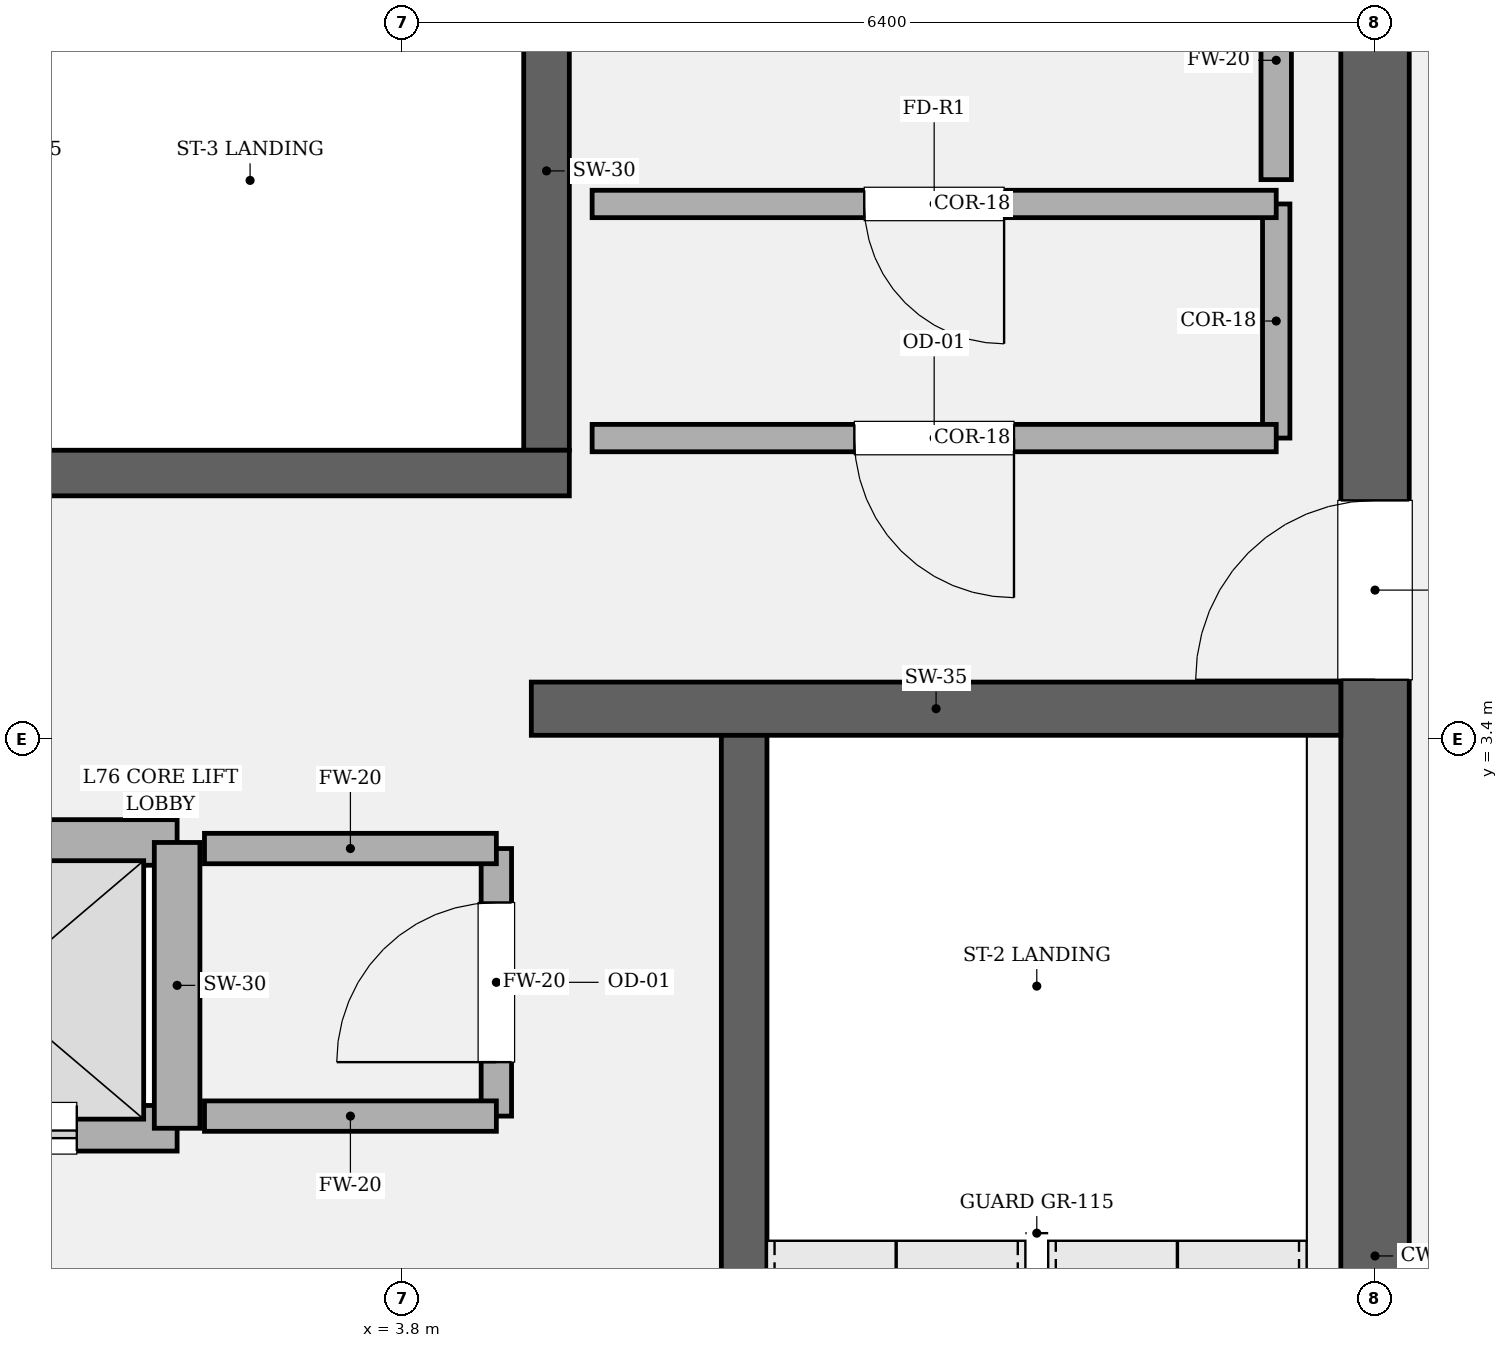
"""IFC4 building model, lengths in metres.
Left out: names, types, materials, properties, quantities, classifications, styles, units other than length and angle.
Written with IfcOpenShell. Run it as: python <this file> out.ifc"""

import sys

from ifc_helpers import new_model, si_unit, direction, frame, frame_2d, origin, place, context, subcontext, project, spatial, rectangle, extrude, element, fill, save


model = new_model("IFC4")
c1 = context("Model", 3, precision=1e-05, world=origin(), true_north=direction((0.0, 1.0)))
c2 = subcontext(c1, "Body", "Model", "MODEL_VIEW")
j1 = project(units=[si_unit("LENGTHUNIT", "METRE"), si_unit("PLANEANGLEUNIT", "RADIAN")], contexts=[c1])
p1 = place(None, origin())
s1 = spatial("IfcSite", under=j1, at=p1, CompositionType="ELEMENT")
p2 = place(p1, origin())
s2 = spatial("IfcBuilding", under=s1, at=p2, CompositionType="ELEMENT")
p3 = place(p2, frame((0.0, 0.0, 321.6)))
s3 = spatial("IfcBuildingStorey", under=s2, at=p3, CompositionType="ELEMENT", Elevation=321.6)
p4 = place(p3, frame((10.2, 8.975, 0.0), z_axis=(0.0, 0.0, 1.0), x_axis=(0.0, -1.0, 0.0)))
e1 = element("IfcWall", 1, at=p4, inside=s3, PredefinedType="SHEAR", context=c2, shape_type="SweptSolid", body=[
    extrude(rectangle(XDim=17.95, YDim=0.45, at=frame_2d((8.975, 0.0))), origin(), (0.0, 0.0, 1.0), 4.2),
])
p5 = place(p4, frame((4.005, 0.0, 0.0)))
e2 = element("IfcOpeningElement", 2, at=p5, cuts=e1, PredefinedType="OPENING", context=c2, shape_type="SweptSolid", body=[
    extrude(rectangle(XDim=1.18, YDim=2.2, at=frame_2d((0.59, 1.1))), frame((0.0, 0.235, 0.0), z_axis=(0.0, -1.0, 0.0), x_axis=(1.0, 0.0, 0.0)), (0.0, 0.0, 1.0), 0.47),
])
p6 = place(p3, frame((6.05, 3.45, 0.0), z_axis=(0.0, 0.0, 1.0), x_axis=(0.0, -1.0, 0.0)))
e3 = element("IfcWall", 3, at=p6, inside=s3, PredefinedType="SOLIDWALL", context=c2, shape_type="SweptSolid", body=[
    extrude(rectangle(XDim=8.95, YDim=0.3, at=frame_2d((4.475, 0.0))), origin(), (0.0, 0.0, 1.0), 4.2),
])
p7 = place(p3, frame((4.75, 8.975, 0.0), z_axis=(0.0, 0.0, 1.0), x_axis=(0.0, -1.0, 0.0)))
e4 = element("IfcWall", 4, at=p7, inside=s3, PredefinedType="SOLIDWALL", context=c2, shape_type="SweptSolid", body=[
    extrude(rectangle(XDim=3.675, YDim=0.3, at=frame_2d((1.837, 0.0))), origin(), (0.0, 0.0, 1.0), 4.2),
])
p8 = place(p3, frame((-4.9, 5.15, 0.0), z_axis=(0.0, 0.0, 1.0), x_axis=(1.0, 0.0, 0.0)))
e5 = element("IfcWall", 5, at=p8, inside=s3, PredefinedType="SOLIDWALL", context=c2, shape_type="SweptSolid", body=[
    extrude(rectangle(XDim=9.8, YDim=0.3, at=frame_2d((4.9, 0.0))), origin(), (0.0, 0.0, 1.0), 4.2),
])
p9 = place(p8, frame((0.56, 0.0, 0.0)))
e6 = element("IfcOpeningElement", 6, at=p9, cuts=e5, PredefinedType="OPENING", context=c2, shape_type="SweptSolid", body=[
    extrude(rectangle(XDim=1.18, YDim=2.2, at=frame_2d((0.59, 1.1))), frame((0.0, 0.16, 0.0), z_axis=(0.0, -1.0, 0.0), x_axis=(1.0, 0.0, 0.0)), (0.0, 0.0, 1.0), 0.32),
])
p10 = place(p3, frame((4.65, 3.6, 0.0), z_axis=(0.0, 0.0, 1.0), x_axis=(1.0, 0.0, 0.0)))
e7 = element("IfcWall", 7, at=p10, inside=s3, PredefinedType="SOLIDWALL", context=c2, shape_type="SweptSolid", body=[
    extrude(rectangle(XDim=5.325, YDim=0.35, at=frame_2d((2.663, 0.0))), origin(), (0.0, 0.0, 1.0), 4.2),
])
p11 = place(p3, frame((-2.32, 0.84, 0.0), z_axis=(0.0, 0.0, 1.0), x_axis=(1.0, 0.0, 0.0)))
e8 = element("IfcWall", 8, at=p11, inside=s3, PredefinedType="SOLIDWALL", context=c2, shape_type="SweptSolid", body=[
    extrude(rectangle(XDim=4.64, YDim=0.3, at=frame_2d((2.32, 0.0))), origin(), (0.0, 0.0, 1.0), 4.0),
])
p12 = place(p11, frame((0.66, 0.0, 0.0)))
e9 = element("IfcOpeningElement", 9, at=p12, cuts=e8, PredefinedType="OPENING", context=c2, shape_type="SweptSolid", body=[
    extrude(rectangle(XDim=1.12, YDim=2.25, at=frame_2d((0.56, 1.125))), frame((0.0, 0.16, 0.0), z_axis=(0.0, -1.0, 0.0), x_axis=(1.0, 0.0, 0.0)), (0.0, 0.0, 1.0), 0.32),
])
p13 = place(p11, frame((2.86, 0.0, 0.0)))
e10 = element("IfcOpeningElement", 10, at=p13, cuts=e8, PredefinedType="OPENING", context=c2, shape_type="SweptSolid", body=[
    extrude(rectangle(XDim=1.12, YDim=2.25, at=frame_2d((0.56, 1.125))), frame((0.0, 0.16, 0.0), z_axis=(0.0, -1.0, 0.0), x_axis=(1.0, 0.0, 0.0)), (0.0, 0.0, 1.0), 0.32),
])
p14 = place(p3, frame((-2.32, 2.72, 0.0), z_axis=(0.0, 0.0, 1.0), x_axis=(1.0, 0.0, 0.0)))
e11 = element("IfcWall", 11, at=p14, inside=s3, PredefinedType="SOLIDWALL", context=c2, shape_type="SweptSolid", body=[
    extrude(rectangle(XDim=4.64, YDim=0.3, at=frame_2d((2.32, 0.0))), origin(), (0.0, 0.0, 1.0), 4.0),
])
p15 = place(p3, frame((2.32, 0.84, 0.0), z_axis=(0.0, 0.0, 1.0), x_axis=(0.0, 1.0, 0.0)))
e12 = element("IfcWall", 12, at=p15, inside=s3, PredefinedType="SOLIDWALL", context=c2, shape_type="SweptSolid", body=[
    extrude(rectangle(XDim=1.88, YDim=0.3, at=frame_2d((0.94, 0.0))), origin(), (0.0, 0.0, 1.0), 4.0),
])
p16 = place(p3, frame((4.42, 0.92, 0.0), z_axis=(0.0, 0.0, 1.0), x_axis=(0.0, 1.0, 0.0)))
e13 = element("IfcWall", 13, at=p16, inside=s3, PredefinedType="SOLIDWALL", context=c2, shape_type="SweptSolid", body=[
    extrude(rectangle(XDim=1.76, YDim=0.2, at=frame_2d((0.88, 0.0))), origin(), (0.0, 0.0, 1.0), 4.0),
])
p17 = place(p16, frame((0.355, 0.0, 0.0)))
e14 = element("IfcOpeningElement", 14, at=p17, cuts=e13, PredefinedType="OPENING", context=c2, shape_type="SweptSolid", body=[
    extrude(rectangle(XDim=1.05, YDim=2.2, at=frame_2d((0.525, 1.1))), frame((0.0, 0.11, 0.0), z_axis=(0.0, -1.0, 0.0), x_axis=(1.0, 0.0, 0.0)), (0.0, 0.0, 1.0), 0.22),
])
for number, where, z_axis, x_axis in (
    (15, (4.42, 2.68, 0.0), (0.0, 0.0, 1.0), (-1.0, 0.0, 0.0)),
    (16, (2.5, 0.92, 0.0), (0.0, 0.0, 1.0), (1.0, 0.0, 0.0)),
):
    element("IfcWall", number, at=place(p3, frame(where, z_axis=z_axis, x_axis=x_axis)), inside=s3, PredefinedType="SOLIDWALL", context=c2, shape_type="SweptSolid", body=[
        extrude(rectangle(XDim=1.92, YDim=0.2, at=frame_2d((0.96, 0.0))), origin(), (0.0, 0.0, 1.0), 4.0),
    ])
p18 = place(p3, frame((9.55, 5.38, 0.0), z_axis=(0.0, 0.0, 1.0), x_axis=(0.0, 1.0, 0.0)))
e17 = element("IfcWall", 17, at=p18, inside=s3, PredefinedType="PARTITIONING", context=c2, shape_type="SweptSolid", body=[
    extrude(rectangle(XDim=1.54, YDim=0.18, at=frame_2d((0.77, 0.0))), origin(), (0.0, 0.0, 1.0), 4.0),
])
p19 = place(p3, frame((9.55, 6.92, 0.0), z_axis=(0.0, 0.0, 1.0), x_axis=(-1.0, 0.0, 0.0)))
e18 = element("IfcWall", 18, at=p19, inside=s3, PredefinedType="PARTITIONING", context=c2, shape_type="SweptSolid", body=[
    extrude(rectangle(XDim=4.5, YDim=0.18, at=frame_2d((2.25, 0.0))), origin(), (0.0, 0.0, 1.0), 4.0),
])
p20 = place(p19, frame((1.79, 0.0, 0.0)))
e19 = element("IfcOpeningElement", 19, at=p20, cuts=e18, PredefinedType="OPENING", context=c2, shape_type="SweptSolid", body=[
    extrude(rectangle(XDim=0.92, YDim=2.1, at=frame_2d((0.46, 1.05))), frame((0.0, 0.1, 0.0), z_axis=(0.0, -1.0, 0.0), x_axis=(1.0, 0.0, 0.0)), (0.0, 0.0, 1.0), 0.2),
])
p21 = place(p3, frame((5.05, 5.38, 0.0), z_axis=(0.0, 0.0, 1.0), x_axis=(1.0, 0.0, 0.0)))
e20 = element("IfcWall", 20, at=p21, inside=s3, PredefinedType="PARTITIONING", context=c2, shape_type="SweptSolid", body=[
    extrude(rectangle(XDim=4.5, YDim=0.18, at=frame_2d((2.25, 0.0))), origin(), (0.0, 0.0, 1.0), 4.0),
])
p22 = place(p21, frame((1.725, 0.0, 0.0)))
e21 = element("IfcOpeningElement", 21, at=p22, cuts=e20, PredefinedType="OPENING", context=c2, shape_type="SweptSolid", body=[
    extrude(rectangle(XDim=1.05, YDim=2.2, at=frame_2d((0.525, 1.1))), frame((0.0, 0.1, 0.0), z_axis=(0.0, -1.0, 0.0), x_axis=(1.0, 0.0, 0.0)), (0.0, 0.0, 1.0), 0.2),
])
p23 = place(p3, frame((9.55, 7.08, 0.0), z_axis=(0.0, 0.0, 1.0), x_axis=(0.0, 1.0, 0.0)))
e22 = element("IfcWall", 22, at=p23, inside=s3, PredefinedType="SOLIDWALL", context=c2, shape_type="SweptSolid", body=[
    extrude(rectangle(XDim=1.57, YDim=0.2, at=frame_2d((0.785, 0.0))), origin(), (0.0, 0.0, 1.0), 4.0),
])
p24 = place(p5, origin())
e23 = element("IfcDoor", 23, at=p24, inside=s3, OperationType="SINGLE_SWING_RIGHT", PredefinedType="DOOR", context=c2, shape_type="SweptSolid", body=[
    extrude(rectangle(XDim=1.18, YDim=2.2, at=frame_2d((0.59, 1.1))), frame((0.0, 0.025, 0.0), z_axis=(0.0, -1.0, 0.0), x_axis=(1.0, 0.0, 0.0)), (0.0, 0.0, 1.0), 0.05),
])
fill(e2, e23)
p25 = place(p13, origin())
e24 = element("IfcDoor", 24, at=p25, inside=s3, OperationType="DOUBLE_DOOR_SLIDING", PredefinedType="DOOR", context=c2, shape_type="SweptSolid", body=[
    extrude(rectangle(XDim=1.12, YDim=2.25, at=frame_2d((0.56, 1.125))), frame((0.0, 0.025, 0.0), z_axis=(0.0, -1.0, 0.0), x_axis=(1.0, 0.0, 0.0)), (0.0, 0.0, 1.0), 0.05),
])
fill(e10, e24)
p26 = place(p17, origin())
e25 = element("IfcDoor", 25, at=p26, inside=s3, OperationType="SINGLE_SWING_LEFT", PredefinedType="DOOR", context=c2, shape_type="SweptSolid", body=[
    extrude(rectangle(XDim=1.05, YDim=2.2, at=frame_2d((0.525, 1.1))), frame((0.0, 0.025, 0.0), z_axis=(0.0, -1.0, 0.0), x_axis=(1.0, 0.0, 0.0)), (0.0, 0.0, 1.0), 0.05),
])
fill(e14, e25)
p27 = place(p22, origin())
e26 = element("IfcDoor", 26, at=p27, inside=s3, OperationType="SINGLE_SWING_RIGHT", PredefinedType="DOOR", context=c2, shape_type="SweptSolid", body=[
    extrude(rectangle(XDim=1.05, YDim=2.2, at=frame_2d((0.525, 1.1))), frame((0.0, 0.025, 0.0), z_axis=(0.0, -1.0, 0.0), x_axis=(1.0, 0.0, 0.0)), (0.0, 0.0, 1.0), 0.05),
])
fill(e21, e26)
p28 = place(p20, origin())
e27 = element("IfcDoor", 27, at=p28, inside=s3, OperationType="SINGLE_SWING_LEFT", PredefinedType="DOOR", context=c2, shape_type="SweptSolid", body=[
    extrude(rectangle(XDim=0.92, YDim=2.1, at=frame_2d((0.46, 1.05))), frame((0.0, 0.025, 0.0), z_axis=(0.0, -1.0, 0.0), x_axis=(1.0, 0.0, 0.0)), (0.0, 0.0, 1.0), 0.05),
])
fill(e19, e27)
save(model, sys.argv[1])
